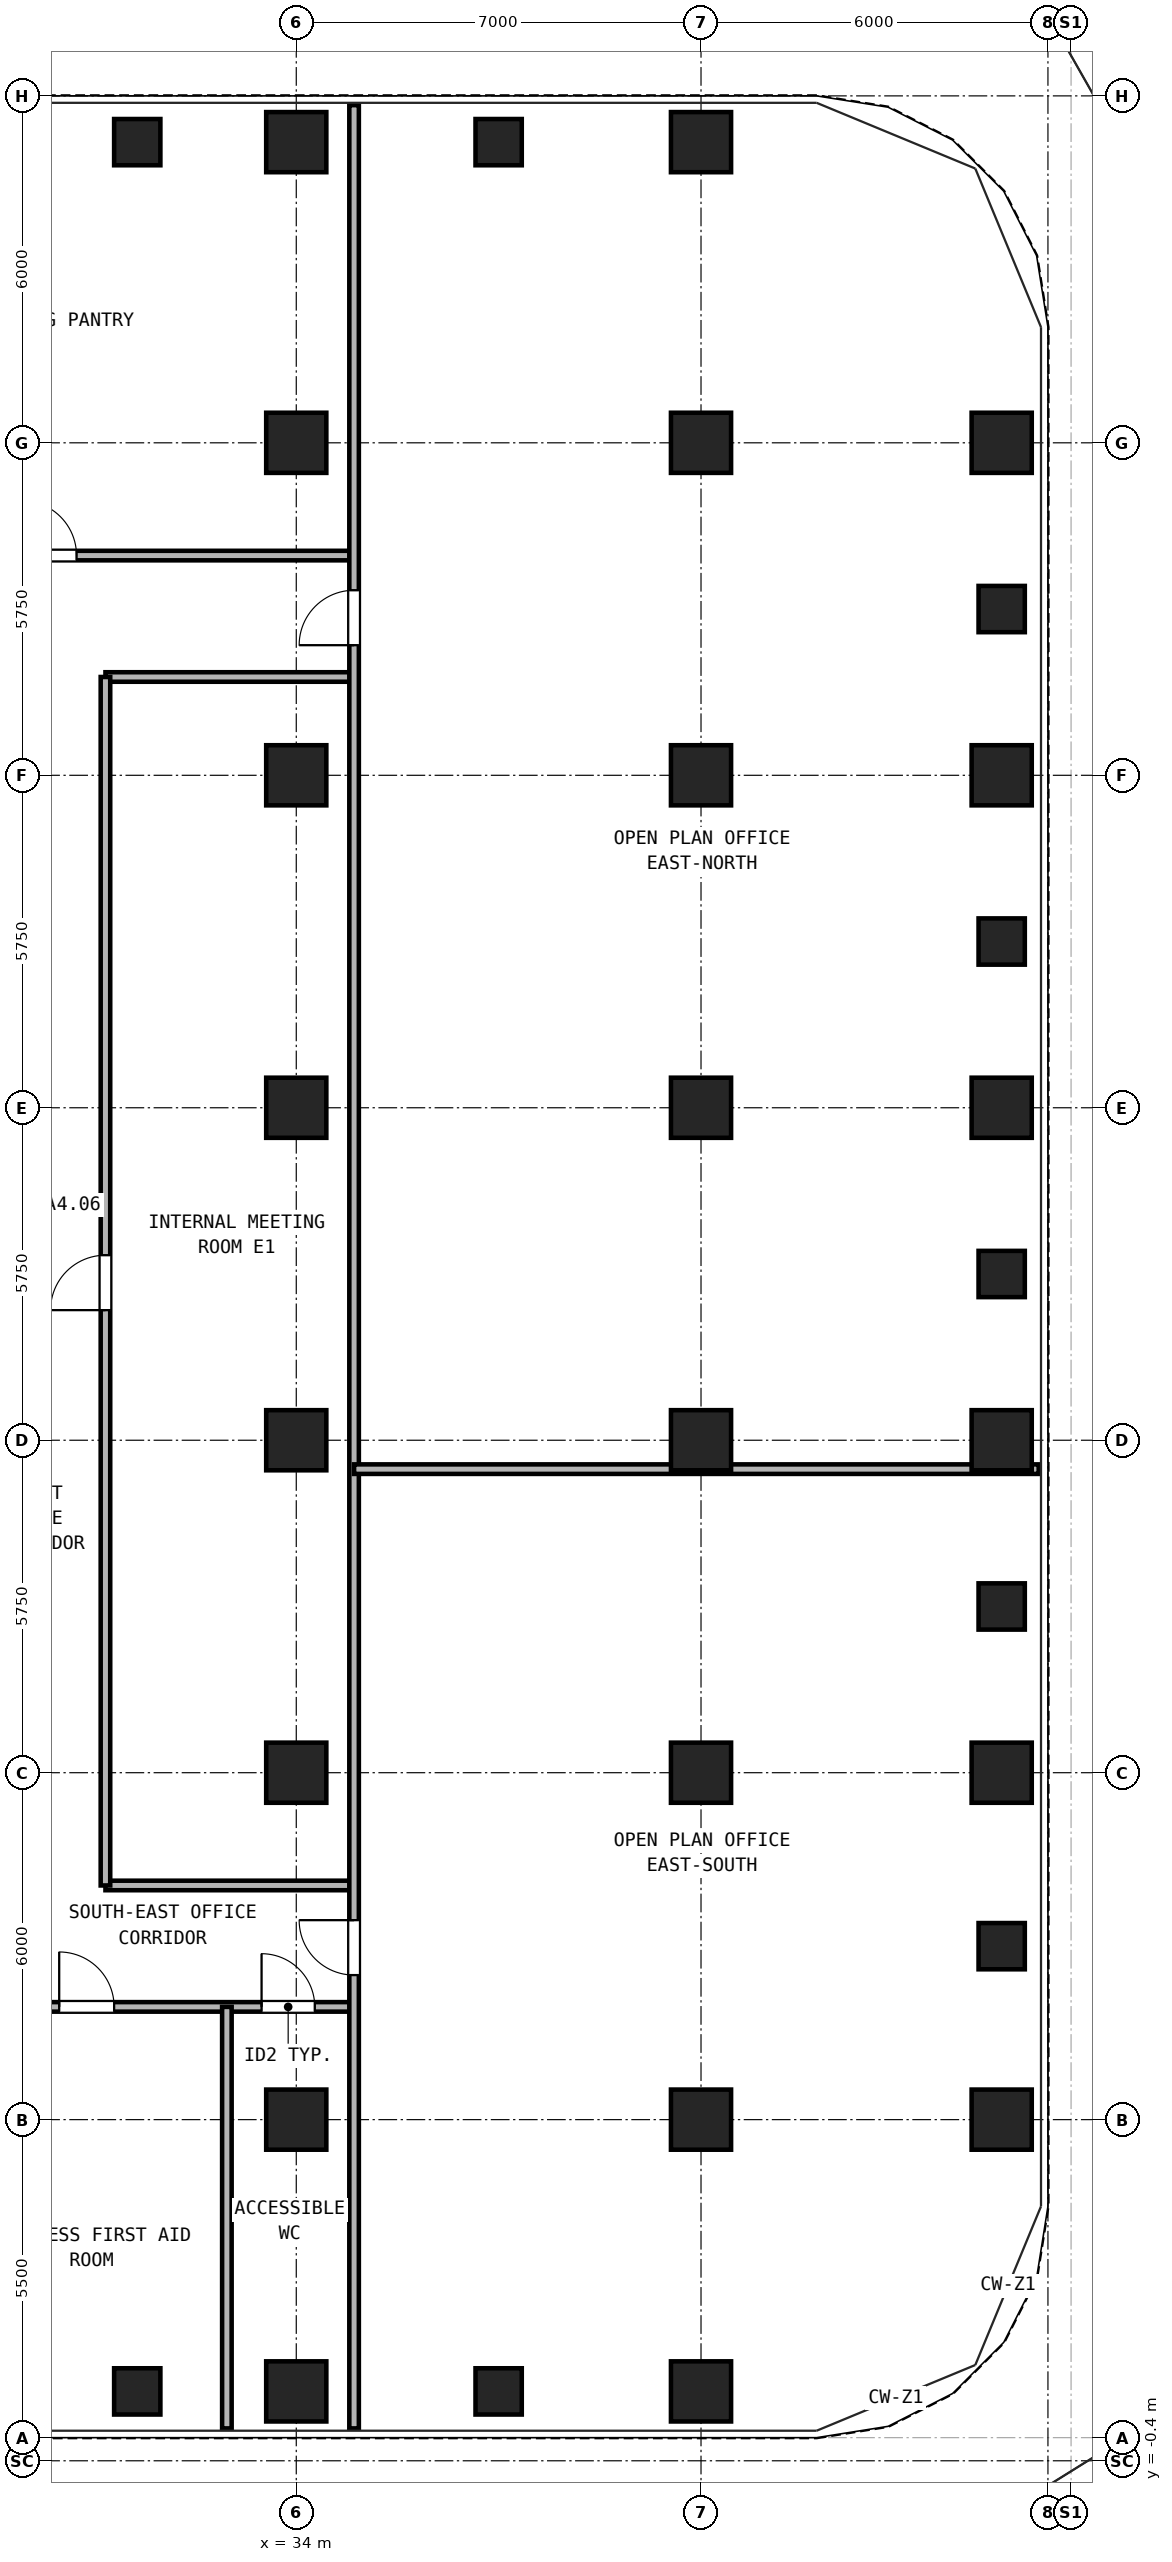
"""IFC4 building model, lengths in metres.
Left out: names, types, materials, properties, quantities, classifications, styles, units other than length and angle.
Written with IfcOpenShell. Run it as: python <this file> out.ifc"""

import sys

from ifc_helpers import new_model, si_unit, direction, frame, frame_2d, origin, origin_2d, place, context, subcontext, project, spatial, rectangle, hollow_rectangle, extrude, source, transform, mapped, element, fill, save


model = new_model("IFC4")
c1 = context("Model", 3, precision=1e-05, world=origin(), true_north=direction((0.0, 1.0)))
c2 = subcontext(c1, "Body", "Model", "MODEL_VIEW")
j1 = project(units=[si_unit("LENGTHUNIT", "METRE"), si_unit("PLANEANGLEUNIT", "RADIAN")], contexts=[c1])
p1 = place(None, origin())
s1 = spatial("IfcSite", under=j1, at=p1, CompositionType="ELEMENT")
p2 = place(p1, origin())
s2 = spatial("IfcBuilding", under=s1, at=p2, CompositionType="ELEMENT")
p3 = place(p2, frame((0.0, 0.0, 62.1)))
s3 = spatial("IfcBuildingStorey", under=s2, at=p3, CompositionType="ELEMENT", Elevation=62.1)
m1 = source(origin(), c2, "Body", "SweptSolid", [
    extrude(hollow_rectangle(XDim=1.04, YDim=1.04, WallThickness=0.065, at=origin_2d()), origin(), (0.0, 0.0, 1.0), 3.32),
])
for number, where, z_axis, x_axis in (
    (1, (34.0, 0.8, 0.0), (0.0, 0.0, 1.0), (1.0, 0.0, 0.0)),
    (2, (34.0, 39.7, 0.0), (0.0, 0.0, 1.0), (1.0, 0.0, 0.0)),
    (3, (41.0, 0.8, 0.0), (0.0, 0.0, 1.0), (1.0, 0.0, 0.0)),
    (4, (41.0, 39.7, 0.0), (0.0, 0.0, 1.0), (1.0, 0.0, 0.0)),
    (5, (46.2, 5.5, 0.0), (0.0, 0.0, 1.0), (1.0, 0.0, 0.0)),
    (6, (46.2, 11.5, 0.0), (0.0, 0.0, 1.0), (1.0, 0.0, 0.0)),
    (7, (46.2, 17.25, 0.0), (0.0, 0.0, 1.0), (1.0, 0.0, 0.0)),
    (8, (46.2, 23.0, 0.0), (0.0, 0.0, 1.0), (1.0, 0.0, 0.0)),
    (9, (46.2, 28.75, 0.0), (0.0, 0.0, 1.0), (1.0, 0.0, 0.0)),
    (10, (46.2, 34.5, 0.0), (0.0, 0.0, 1.0), (1.0, 0.0, 0.0)),
    (11, (34.0, 5.5, 0.0), (0.0, 0.0, 1.0), (1.0, 0.0, 0.0)),
    (12, (34.0, 11.5, 0.0), (0.0, 0.0, 1.0), (1.0, 0.0, 0.0)),
    (13, (34.0, 17.25, 0.0), (0.0, 0.0, 1.0), (1.0, 0.0, 0.0)),
    (14, (34.0, 23.0, 0.0), (0.0, 0.0, 1.0), (1.0, 0.0, 0.0)),
    (15, (34.0, 28.75, 0.0), (0.0, 0.0, 1.0), (1.0, 0.0, 0.0)),
    (16, (34.0, 34.5, 0.0), (0.0, 0.0, 1.0), (1.0, 0.0, 0.0)),
    (17, (41.0, 5.5, 0.0), (0.0, 0.0, 1.0), (1.0, 0.0, 0.0)),
    (18, (41.0, 11.5, 0.0), (0.0, 0.0, 1.0), (1.0, 0.0, 0.0)),
    (19, (41.0, 17.25, 0.0), (0.0, 0.0, 1.0), (1.0, 0.0, 0.0)),
    (20, (41.0, 23.0, 0.0), (0.0, 0.0, 1.0), (1.0, 0.0, 0.0)),
    (21, (41.0, 28.75, 0.0), (0.0, 0.0, 1.0), (1.0, 0.0, 0.0)),
    (22, (41.0, 34.5, 0.0), (0.0, 0.0, 1.0), (1.0, 0.0, 0.0)),
):
    element("IfcColumn", number, at=place(p3, frame(where, z_axis=z_axis, x_axis=x_axis)), inside=s3, PredefinedType="COLUMN", context=c2, shape_type="MappedRepresentation", body=[
        mapped(m1, transform((0.0, 0.0, 0.0), x_axis=(1.0, 0.0, 0.0), y_axis=(0.0, 1.0, 0.0), z_axis=(0.0, 0.0, 1.0), scale=1.0)),
    ])
m2 = source(origin(), c2, "Body", "SweptSolid", [
    extrude(hollow_rectangle(XDim=0.8, YDim=0.8, WallThickness=0.045, at=origin_2d()), origin(), (0.0, 0.0, 1.0), 3.32),
])
for number, where, z_axis, x_axis in (
    (23, (31.25, 0.8, 0.0), (0.0, 0.0, 1.0), (1.0, 0.0, 0.0)),
    (24, (31.25, 39.7, 0.0), (0.0, 0.0, 1.0), (1.0, 0.0, 0.0)),
    (25, (37.5, 0.8, 0.0), (0.0, 0.0, 1.0), (1.0, 0.0, 0.0)),
    (26, (37.5, 39.7, 0.0), (0.0, 0.0, 1.0), (1.0, 0.0, 0.0)),
    (27, (46.2, 8.5, 0.0), (0.0, 0.0, 1.0), (1.0, 0.0, 0.0)),
    (28, (46.2, 14.375, 0.0), (0.0, 0.0, 1.0), (1.0, 0.0, 0.0)),
    (29, (46.2, 20.125, 0.0), (0.0, 0.0, 1.0), (1.0, 0.0, 0.0)),
    (30, (46.2, 25.875, 0.0), (0.0, 0.0, 1.0), (1.0, 0.0, 0.0)),
    (31, (46.2, 31.625, 0.0), (0.0, 0.0, 1.0), (1.0, 0.0, 0.0)),
):
    element("IfcColumn", number, at=place(p3, frame(where, z_axis=z_axis, x_axis=x_axis)), inside=s3, PredefinedType="COLUMN", context=c2, shape_type="MappedRepresentation", body=[
        mapped(m2, transform((0.0, 0.0, 0.0), x_axis=(1.0, 0.0, 0.0), y_axis=(0.0, 1.0, 0.0), z_axis=(0.0, 0.0, 1.0), scale=1.0)),
    ])
p4 = place(p3, frame((12.0, 7.45, 0.0), z_axis=(0.0, 0.0, 1.0), x_axis=(1.0, 0.0, 0.0)))
e32 = element("IfcWall", 32, at=p4, inside=s3, PredefinedType="PARTITIONING", context=c2, shape_type="SweptSolid", body=[
    extrude(rectangle(XDim=23.0, YDim=0.165, at=frame_2d((11.5, 0.0))), origin(), (0.0, 0.0, 1.0), 3.32),
])
p5 = place(p4, frame((7.5, 0.0, 0.0)))
e33 = element("IfcOpeningElement", 33, at=p5, cuts=e32, PredefinedType="OPENING", context=c2, shape_type="SweptSolid", body=[
    extrude(rectangle(XDim=0.95, YDim=2.15, at=frame_2d((0.475, 1.075))), frame((0.0, 0.093, 0.0), z_axis=(0.0, -1.0, 0.0), x_axis=(1.0, 0.0, 0.0)), (0.0, 0.0, 1.0), 0.185),
])
p6 = place(p4, frame((17.9, 0.0, 0.0)))
e34 = element("IfcOpeningElement", 34, at=p6, cuts=e32, PredefinedType="OPENING", context=c2, shape_type="SweptSolid", body=[
    extrude(rectangle(XDim=0.95, YDim=2.15, at=frame_2d((0.475, 1.075))), frame((0.0, 0.093, 0.0), z_axis=(0.0, -1.0, 0.0), x_axis=(1.0, 0.0, 0.0)), (0.0, 0.0, 1.0), 0.185),
])
p7 = place(p4, frame((21.4, 0.0, 0.0)))
e35 = element("IfcOpeningElement", 35, at=p7, cuts=e32, PredefinedType="OPENING", context=c2, shape_type="SweptSolid", body=[
    extrude(rectangle(XDim=0.92, YDim=2.1, at=frame_2d((0.46, 1.05))), frame((0.0, 0.093, 0.0), z_axis=(0.0, -1.0, 0.0), x_axis=(1.0, 0.0, 0.0)), (0.0, 0.0, 1.0), 0.185),
])
p8 = place(p3, frame((12.0, 32.55, 0.0), z_axis=(0.0, 0.0, 1.0), x_axis=(1.0, 0.0, 0.0)))
e36 = element("IfcWall", 36, at=p8, inside=s3, PredefinedType="PARTITIONING", context=c2, shape_type="SweptSolid", body=[
    extrude(rectangle(XDim=23.0, YDim=0.165, at=frame_2d((11.5, 0.0))), origin(), (0.0, 0.0, 1.0), 3.32),
])
p9 = place(p8, frame((5.75, 0.0, 0.0)))
e37 = element("IfcOpeningElement", 37, at=p9, cuts=e36, PredefinedType="OPENING", context=c2, shape_type="SweptSolid", body=[
    extrude(rectangle(XDim=0.95, YDim=2.15, at=frame_2d((0.475, 1.075))), frame((0.0, 0.093, 0.0), z_axis=(0.0, -1.0, 0.0), x_axis=(1.0, 0.0, 0.0)), (0.0, 0.0, 1.0), 0.185),
])
p10 = place(p8, frame((17.25, 0.0, 0.0)))
e38 = element("IfcOpeningElement", 38, at=p10, cuts=e36, PredefinedType="OPENING", context=c2, shape_type="SweptSolid", body=[
    extrude(rectangle(XDim=0.95, YDim=2.15, at=frame_2d((0.475, 1.075))), frame((0.0, 0.093, 0.0), z_axis=(0.0, -1.0, 0.0), x_axis=(1.0, 0.0, 0.0)), (0.0, 0.0, 1.0), 0.185),
])
for number, where, z_axis, x_axis in (
    (39, (30.7, 9.55, 0.0), (0.0, 0.0, 1.0), (1.0, 0.0, 0.0)),
    (40, (30.7, 30.45, 0.0), (0.0, 0.0, 1.0), (1.0, 0.0, 0.0)),
):
    element("IfcWall", number, at=place(p3, frame(where, z_axis=z_axis, x_axis=x_axis)), inside=s3, PredefinedType="PARTITIONING", context=c2, shape_type="SweptSolid", body=[
        extrude(rectangle(XDim=4.3, YDim=0.165, at=frame_2d((2.15, 0.0))), origin(), (0.0, 0.0, 1.0), 3.32),
    ])
p11 = place(p3, frame((30.7, 9.55, 0.0), z_axis=(0.0, 0.0, 1.0), x_axis=(0.0, 1.0, 0.0)))
e41 = element("IfcWall", 41, at=p11, inside=s3, PredefinedType="PARTITIONING", context=c2, shape_type="SweptSolid", body=[
    extrude(rectangle(XDim=20.9, YDim=0.165, at=frame_2d((10.45, 0.0))), origin(), (0.0, 0.0, 1.0), 3.32),
])
p12 = place(p11, frame((9.95, 0.0, 0.0)))
e42 = element("IfcOpeningElement", 42, at=p12, cuts=e41, PredefinedType="OPENING", context=c2, shape_type="SweptSolid", body=[
    extrude(rectangle(XDim=0.95, YDim=2.15, at=frame_2d((0.475, 1.075))), frame((0.0, 0.093, 0.0), z_axis=(0.0, -1.0, 0.0), x_axis=(1.0, 0.0, 0.0)), (0.0, 0.0, 1.0), 0.185),
])
p13 = place(p3, frame((35.0, 0.16, 0.0), z_axis=(0.0, 0.0, 1.0), x_axis=(0.0, 1.0, 0.0)))
e43 = element("IfcWall", 43, at=p13, inside=s3, PredefinedType="PARTITIONING", context=c2, shape_type="SweptSolid", body=[
    extrude(rectangle(XDim=40.18, YDim=0.165, at=frame_2d((20.09, 0.0))), origin(), (0.0, 0.0, 1.0), 3.32),
])
p14 = place(p13, frame((7.84, 0.0, 0.0)))
e44 = element("IfcOpeningElement", 44, at=p14, cuts=e43, PredefinedType="OPENING", context=c2, shape_type="SweptSolid", body=[
    extrude(rectangle(XDim=0.95, YDim=2.15, at=frame_2d((0.475, 1.075))), frame((0.0, 0.093, 0.0), z_axis=(0.0, -1.0, 0.0), x_axis=(1.0, 0.0, 0.0)), (0.0, 0.0, 1.0), 0.185),
])
p15 = place(p13, frame((30.84, 0.0, 0.0)))
e45 = element("IfcOpeningElement", 45, at=p15, cuts=e43, PredefinedType="OPENING", context=c2, shape_type="SweptSolid", body=[
    extrude(rectangle(XDim=0.95, YDim=2.15, at=frame_2d((0.475, 1.075))), frame((0.0, 0.093, 0.0), z_axis=(0.0, -1.0, 0.0), x_axis=(1.0, 0.0, 0.0)), (0.0, 0.0, 1.0), 0.185),
])
p16 = place(p3, frame((32.8, 0.16, 0.0), z_axis=(0.0, 0.0, 1.0), x_axis=(0.0, 1.0, 0.0)))
e46 = element("IfcWall", 46, at=p16, inside=s3, PredefinedType="PARTITIONING", context=c2, shape_type="SweptSolid", body=[
    extrude(rectangle(XDim=7.29, YDim=0.165, at=frame_2d((3.645, 0.0))), origin(), (0.0, 0.0, 1.0), 3.32),
])
p17 = place(p3, frame((35.0, 16.75, 0.0), z_axis=(0.0, 0.0, 1.0), x_axis=(1.0, 0.0, 0.0)))
e47 = element("IfcWall", 47, at=p17, inside=s3, PredefinedType="PARTITIONING", context=c2, shape_type="SweptSolid", body=[
    extrude(rectangle(XDim=11.84, YDim=0.165, at=frame_2d((5.92, 0.0))), origin(), (0.0, 0.0, 1.0), 3.32),
])
p18 = place(p6, frame((0.95, 0.0, 0.0), z_axis=(0.0, 0.0, 1.0), x_axis=(-1.0, 0.0, 0.0)))
e48 = element("IfcDoor", 48, at=p18, inside=s3, OperationType="SINGLE_SWING_LEFT", PredefinedType="DOOR", context=c2, shape_type="SweptSolid", body=[
    extrude(rectangle(XDim=0.95, YDim=2.15, at=frame_2d((0.475, 1.075))), frame((0.0, 0.025, 0.0), z_axis=(0.0, -1.0, 0.0), x_axis=(1.0, 0.0, 0.0)), (0.0, 0.0, 1.0), 0.05),
])
fill(e34, e48)
p19 = place(p7, frame((0.92, 0.0, 0.0), z_axis=(0.0, 0.0, 1.0), x_axis=(-1.0, 0.0, 0.0)))
e49 = element("IfcDoor", 49, at=p19, inside=s3, OperationType="SINGLE_SWING_LEFT", PredefinedType="DOOR", context=c2, shape_type="SweptSolid", body=[
    extrude(rectangle(XDim=0.92, YDim=2.1, at=frame_2d((0.46, 1.05))), frame((0.0, 0.025, 0.0), z_axis=(0.0, -1.0, 0.0), x_axis=(1.0, 0.0, 0.0)), (0.0, 0.0, 1.0), 0.05),
])
fill(e35, e49)
p20 = place(p10, origin())
e50 = element("IfcDoor", 50, at=p20, inside=s3, OperationType="SINGLE_SWING_LEFT", PredefinedType="DOOR", context=c2, shape_type="SweptSolid", body=[
    extrude(rectangle(XDim=0.95, YDim=2.15, at=frame_2d((0.475, 1.075))), frame((0.0, 0.025, 0.0), z_axis=(0.0, -1.0, 0.0), x_axis=(1.0, 0.0, 0.0)), (0.0, 0.0, 1.0), 0.05),
])
fill(e38, e50)
p21 = place(p14, origin())
e51 = element("IfcDoor", 51, at=p21, inside=s3, OperationType="SINGLE_SWING_RIGHT", PredefinedType="DOOR", context=c2, shape_type="SweptSolid", body=[
    extrude(rectangle(XDim=0.95, YDim=2.15, at=frame_2d((0.475, 1.075))), frame((0.0, 0.025, 0.0), z_axis=(0.0, -1.0, 0.0), x_axis=(1.0, 0.0, 0.0)), (0.0, 0.0, 1.0), 0.05),
])
fill(e44, e51)
p22 = place(p15, origin())
e52 = element("IfcDoor", 52, at=p22, inside=s3, OperationType="SINGLE_SWING_LEFT", PredefinedType="DOOR", context=c2, shape_type="SweptSolid", body=[
    extrude(rectangle(XDim=0.95, YDim=2.15, at=frame_2d((0.475, 1.075))), frame((0.0, 0.025, 0.0), z_axis=(0.0, -1.0, 0.0), x_axis=(1.0, 0.0, 0.0)), (0.0, 0.0, 1.0), 0.05),
])
fill(e45, e52)
p23 = place(p12, origin())
e53 = element("IfcDoor", 53, at=p23, inside=s3, OperationType="SINGLE_SWING_LEFT", PredefinedType="DOOR", context=c2, shape_type="SweptSolid", body=[
    extrude(rectangle(XDim=0.95, YDim=2.15, at=frame_2d((0.475, 1.075))), frame((0.0, 0.025, 0.0), z_axis=(0.0, -1.0, 0.0), x_axis=(1.0, 0.0, 0.0)), (0.0, 0.0, 1.0), 0.05),
])
fill(e42, e53)
save(model, sys.argv[1])
